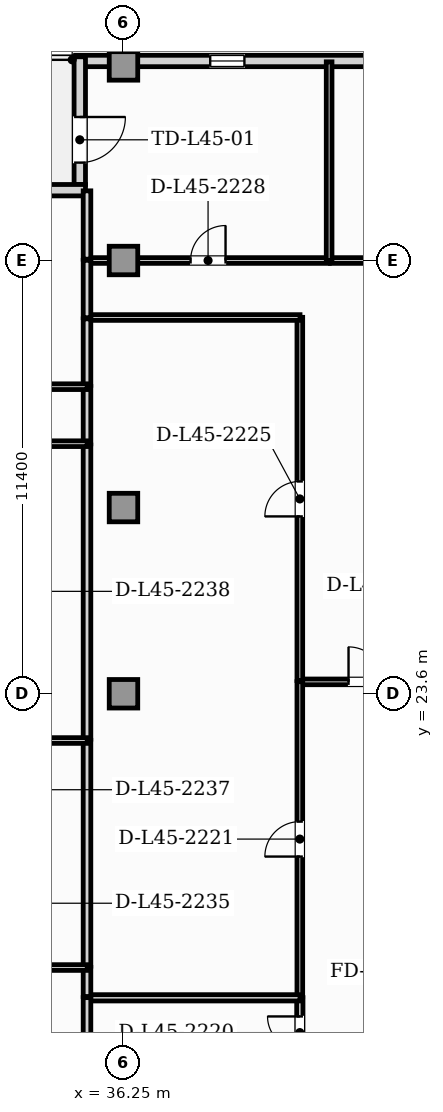
"""IFC4 building model, lengths in metres.
Left out: names, types, materials, properties, quantities, classifications, styles, units other than length and angle.
Written with IfcOpenShell. Run it as: python <this file> out.ifc"""

import sys

from ifc_helpers import new_model, si_unit, direction, frame, frame_2d, origin, origin_2d, place, context, subcontext, project, spatial, rectangle, extrude, element, fill, save


model = new_model("IFC4")
c1 = context("Model", 3, precision=1e-05, world=origin(), true_north=direction((0.0, 1.0)))
c2 = subcontext(c1, "Body", "Model", "MODEL_VIEW")
j1 = project(units=[si_unit("LENGTHUNIT", "METRE"), si_unit("PLANEANGLEUNIT", "RADIAN")], contexts=[c1])
p1 = place(None, origin())
s1 = spatial("IfcSite", under=j1, at=p1, CompositionType="ELEMENT")
p2 = place(p1, origin())
s2 = spatial("IfcBuilding", under=s1, at=p2, CompositionType="ELEMENT")
p3 = place(p2, frame((0.0, 0.0, 183.7)))
s3 = spatial("IfcBuildingStorey", under=s2, at=p3, CompositionType="ELEMENT", Elevation=183.7)
for number, where, z_axis, x_axis in (
    (1, (36.25, 23.6, 0.0), (0.0, 0.0, 1.0), (1.0, 0.0, 0.0)),
    (2, (36.25, 28.5, 0.0), (0.0, 0.0, 1.0), (1.0, 0.0, 0.0)),
    (3, (36.25, 40.12, 0.0), (0.0, 0.0, 1.0), (1.0, 0.0, 0.0)),
    (4, (36.25, 35.0, 0.0), (0.0, 0.0, 1.0), (1.0, 0.0, 0.0)),
):
    element("IfcColumn", number, at=place(p3, frame(where, z_axis=z_axis, x_axis=x_axis)), inside=s3, PredefinedType="COLUMN", context=c2, shape_type="SweptSolid", body=[
        extrude(rectangle(XDim=0.75, YDim=0.75, at=origin_2d()), origin(), (0.0, 0.0, 1.0), 3.85),
    ])
p4 = place(p3, frame((49.06, 40.25, 0.0), z_axis=(0.0, 0.0, 1.0), x_axis=(-1.0, 0.0, 0.0)))
e5 = element("IfcWall", 5, at=p4, inside=s3, PredefinedType="SOLIDWALL", context=c2, shape_type="SweptSolid", body=[
    extrude(rectangle(XDim=14.07, YDim=0.3, at=frame_2d((7.035, 0.0))), origin(), (0.0, 0.0, 1.0), 3.085),
])
p5 = place(p4, frame((9.628, 0.0, 0.85)))
e6 = element("IfcOpeningElement", 6, at=p5, cuts=e5, PredefinedType="OPENING", context=c2, shape_type="SweptSolid", body=[
    extrude(rectangle(XDim=0.9, YDim=1.4, at=frame_2d((0.45, 0.7))), frame((0.0, 0.16, 0.0), z_axis=(0.0, -1.0, 0.0), x_axis=(1.0, 0.0, 0.0)), (0.0, 0.0, 1.0), 0.32),
])
p6 = place(p4, frame((4.416, 0.0, 0.85)))
e7 = element("IfcOpeningElement", 7, at=p6, cuts=e5, PredefinedType="OPENING", context=c2, shape_type="SweptSolid", body=[
    extrude(rectangle(XDim=0.9, YDim=1.4, at=frame_2d((0.45, 0.7))), frame((0.0, 0.16, 0.0), z_axis=(0.0, -1.0, 0.0), x_axis=(1.0, 0.0, 0.0)), (0.0, 0.0, 1.0), 0.32),
])
p7 = place(p3, frame((35.1, 40.36, 0.0), z_axis=(0.0, 0.0, 1.0), x_axis=(0.0, -1.0, 0.0)))
e8 = element("IfcWall", 8, at=p7, inside=s3, PredefinedType="SOLIDWALL", context=c2, shape_type="SweptSolid", body=[
    extrude(rectangle(XDim=3.36, YDim=0.3, at=frame_2d((1.68, 0.0))), origin(), (0.0, 0.0, 1.0), 3.63),
])
p8 = place(p7, frame((1.584, 0.0, 0.0)))
e9 = element("IfcOpeningElement", 9, at=p8, cuts=e8, PredefinedType="OPENING", context=c2, shape_type="SweptSolid", body=[
    extrude(rectangle(XDim=1.2, YDim=2.2, at=frame_2d((0.6, 1.1))), frame((0.0, 0.16, 0.0), z_axis=(0.0, -1.0, 0.0), x_axis=(1.0, 0.0, 0.0)), (0.0, 0.0, 1.0), 0.32),
])
p9 = place(p3, frame((35.25, 36.85, 0.0), z_axis=(0.0, 0.0, 1.0), x_axis=(-1.0, 0.0, 0.0)))
e10 = element("IfcWall", 10, at=p9, inside=s3, PredefinedType="SOLIDWALL", context=c2, shape_type="SweptSolid", body=[
    extrude(rectangle(XDim=13.0, YDim=0.3, at=frame_2d((6.5, 0.0))), origin(), (0.0, 0.0, 1.0), 3.63),
])
p10 = place(p9, frame((8.251, 0.0, 0.88)))
e11 = element("IfcOpeningElement", 11, at=p10, cuts=e10, PredefinedType="OPENING", context=c2, shape_type="SweptSolid", body=[
    extrude(rectangle(XDim=1.65, YDim=2.0, at=frame_2d((0.825, 1.0))), frame((0.0, 0.16, 0.0), z_axis=(0.0, -1.0, 0.0), x_axis=(1.0, 0.0, 0.0)), (0.0, 0.0, 1.0), 0.32),
])
p11 = place(p9, frame((3.099, 0.0, 0.88)))
e12 = element("IfcOpeningElement", 12, at=p11, cuts=e10, PredefinedType="OPENING", context=c2, shape_type="SweptSolid", body=[
    extrude(rectangle(XDim=1.65, YDim=2.0, at=frame_2d((0.825, 1.0))), frame((0.0, 0.16, 0.0), z_axis=(0.0, -1.0, 0.0), x_axis=(1.0, 0.0, 0.0)), (0.0, 0.0, 1.0), 0.32),
])
p12 = place(p3, frame((40.885, 23.913, 0.0), z_axis=(0.0, 0.0, 1.0), x_axis=(1.0, 0.0, 0.0)))
e13 = element("IfcWall", 13, at=p12, inside=s3, PredefinedType="PARTITIONING", context=c2, shape_type="SweptSolid", body=[
    extrude(rectangle(XDim=4.99, YDim=0.15, at=frame_2d((2.495, 0.0))), origin(), (0.0, 0.0, 1.0), 3.63),
])
p13 = place(p12, frame((1.287, 0.0, 0.0)))
e14 = element("IfcOpeningElement", 14, at=p13, cuts=e13, PredefinedType="OPENING", context=c2, shape_type="SweptSolid", body=[
    extrude(rectangle(XDim=0.92, YDim=2.1, at=frame_2d((0.46, 1.05))), frame((0.0, 0.085, 0.0), z_axis=(0.0, -1.0, 0.0), x_axis=(1.0, 0.0, 0.0)), (0.0, 0.0, 1.0), 0.17),
])
p14 = place(p3, frame((40.89, 13.765, 0.0), z_axis=(0.0, 0.0, 1.0), x_axis=(0.0, 1.0, 0.0)))
e15 = element("IfcWall", 15, at=p14, inside=s3, PredefinedType="PLUMBINGWALL", context=c2, shape_type="SweptSolid", body=[
    extrude(rectangle(XDim=1.84, YDim=0.165, at=frame_2d((0.92, 0.0))), origin(), (0.0, 0.0, 1.0), 3.63),
])
p15 = place(p14, frame((0.495, 0.0, 0.0)))
e16 = element("IfcOpeningElement", 16, at=p15, cuts=e15, PredefinedType="OPENING", context=c2, shape_type="SweptSolid", body=[
    extrude(rectangle(XDim=0.85, YDim=2.1, at=frame_2d((0.425, 1.05))), frame((0.0, 0.093, 0.0), z_axis=(0.0, -1.0, 0.0), x_axis=(1.0, 0.0, 0.0)), (0.0, 0.0, 1.0), 0.185),
])
p16 = place(p3, frame((40.89, 15.635, 0.0), z_axis=(0.0, 0.0, 1.0), x_axis=(0.0, 1.0, 0.0)))
e17 = element("IfcWall", 17, at=p16, inside=s3, PredefinedType="PARTITIONING", context=c2, shape_type="SweptSolid", body=[
    extrude(rectangle(XDim=8.283, YDim=0.15, at=frame_2d((4.142, 0.0))), origin(), (0.0, 0.0, 1.0), 3.63),
])
p17 = place(p16, frame((3.682, 0.0, 0.0)))
e18 = element("IfcOpeningElement", 18, at=p17, cuts=e17, PredefinedType="OPENING", context=c2, shape_type="SweptSolid", body=[
    extrude(rectangle(XDim=0.92, YDim=2.1, at=frame_2d((0.46, 1.05))), frame((0.0, 0.085, 0.0), z_axis=(0.0, -1.0, 0.0), x_axis=(1.0, 0.0, 0.0)), (0.0, 0.0, 1.0), 0.17),
])
p18 = place(p3, frame((40.89, 23.948, 0.0), z_axis=(0.0, 0.0, 1.0), x_axis=(0.0, 1.0, 0.0)))
e19 = element("IfcWall", 19, at=p18, inside=s3, PredefinedType="PARTITIONING", context=c2, shape_type="SweptSolid", body=[
    extrude(rectangle(XDim=9.557, YDim=0.15, at=frame_2d((4.778, 0.0))), origin(), (0.0, 0.0, 1.0), 3.63),
])
p19 = place(p18, frame((4.318, 0.0, 0.0)))
e20 = element("IfcOpeningElement", 20, at=p19, cuts=e19, PredefinedType="OPENING", context=c2, shape_type="SweptSolid", body=[
    extrude(rectangle(XDim=0.92, YDim=2.1, at=frame_2d((0.46, 1.05))), frame((0.0, 0.085, 0.0), z_axis=(0.0, -1.0, 0.0), x_axis=(1.0, 0.0, 0.0)), (0.0, 0.0, 1.0), 0.17),
])
p20 = place(p3, frame((35.285, 33.5, 0.0), z_axis=(0.0, 0.0, 1.0), x_axis=(1.0, 0.0, 0.0)))
e21 = element("IfcWall", 21, at=p20, inside=s3, PredefinedType="PARTITIONING", context=c2, shape_type="SweptSolid", body=[
    extrude(rectangle(XDim=5.61, YDim=0.15, at=frame_2d((2.805, 0.0))), origin(), (0.0, 0.0, 1.0), 3.63),
])
p21 = place(p3, frame((35.285, 35.0, 0.0), z_axis=(0.0, 0.0, 1.0), x_axis=(1.0, 0.0, 0.0)))
e22 = element("IfcWall", 22, at=p21, inside=s3, PredefinedType="PARTITIONING", context=c2, shape_type="SweptSolid", body=[
    extrude(rectangle(XDim=6.381, YDim=0.15, at=frame_2d((3.19, 0.0))), origin(), (0.0, 0.0, 1.0), 3.013),
])
p22 = place(p21, frame((2.73, 0.0, 0.0)))
e23 = element("IfcOpeningElement", 23, at=p22, cuts=e22, PredefinedType="OPENING", context=c2, shape_type="SweptSolid", body=[
    extrude(rectangle(XDim=0.92, YDim=2.1, at=frame_2d((0.46, 1.05))), frame((0.0, 0.085, 0.0), z_axis=(0.0, -1.0, 0.0), x_axis=(1.0, 0.0, 0.0)), (0.0, 0.0, 1.0), 0.17),
])
p23 = place(p3, frame((41.696, 35.0, 0.0), z_axis=(0.0, 0.0, 1.0), x_axis=(1.0, 0.0, 0.0)))
e24 = element("IfcWall", 24, at=p23, inside=s3, PredefinedType="PARTITIONING", context=c2, shape_type="SweptSolid", body=[
    extrude(rectangle(XDim=5.038, YDim=0.15, at=frame_2d((2.519, 0.0))), origin(), (0.0, 0.0, 1.0), 3.013),
])
p24 = place(p23, frame((2.814, 0.0, 0.0)))
e25 = element("IfcOpeningElement", 25, at=p24, cuts=e24, PredefinedType="OPENING", context=c2, shape_type="SweptSolid", body=[
    extrude(rectangle(XDim=0.92, YDim=2.1, at=frame_2d((0.46, 1.05))), frame((0.0, 0.085, 0.0), z_axis=(0.0, -1.0, 0.0), x_axis=(1.0, 0.0, 0.0)), (0.0, 0.0, 1.0), 0.17),
])
p25 = place(p3, frame((35.29, 33.495, 0.0), z_axis=(0.0, 0.0, 1.0), x_axis=(0.0, 1.0, 0.0)))
e26 = element("IfcWall", 26, at=p25, inside=s3, PredefinedType="PARTITIONING", context=c2, shape_type="SweptSolid", body=[
    extrude(rectangle(XDim=1.51, YDim=0.2, at=frame_2d((0.755, 0.0))), origin(), (0.0, 0.0, 1.0), 3.63),
])
p26 = place(p3, frame((35.285, 15.6, 0.0), z_axis=(0.0, 0.0, 1.0), x_axis=(1.0, 0.0, 0.0)))
e27 = element("IfcWall", 27, at=p26, inside=s3, PredefinedType="PLUMBINGWALL", context=c2, shape_type="SweptSolid", body=[
    extrude(rectangle(XDim=5.61, YDim=0.165, at=frame_2d((2.805, 0.0))), origin(), (0.0, 0.0, 1.0), 3.63),
])
p27 = place(p3, frame((35.29, 13.765, 0.0), z_axis=(0.0, 0.0, 1.0), x_axis=(0.0, 1.0, 0.0)))
e28 = element("IfcWall", 28, at=p27, inside=s3, PredefinedType="PARTITIONING", context=c2, shape_type="SweptSolid", body=[
    extrude(rectangle(XDim=1.84, YDim=0.2, at=frame_2d((0.92, 0.0))), origin(), (0.0, 0.0, 1.0), 3.63),
])
p28 = place(p3, frame((35.29, 30.175, 0.0), z_axis=(0.0, 0.0, 1.0), x_axis=(0.0, 1.0, 0.0)))
e29 = element("IfcWall", 29, at=p28, inside=s3, PredefinedType="PARTITIONING", context=c2, shape_type="SweptSolid", body=[
    extrude(rectangle(XDim=1.51, YDim=0.2, at=frame_2d((0.755, 0.0))), origin(), (0.0, 0.0, 1.0), 3.63),
])
p29 = place(p3, frame((35.29, 15.635, 0.0), z_axis=(0.0, 0.0, 1.0), x_axis=(0.0, 1.0, 0.0)))
e30 = element("IfcWall", 30, at=p29, inside=s3, PredefinedType="PARTITIONING", context=c2, shape_type="SweptSolid", body=[
    extrude(rectangle(XDim=0.767, YDim=0.2, at=frame_2d((0.383, 0.0))), origin(), (0.0, 0.0, 1.0), 3.63),
])
p30 = place(p3, frame((35.29, 16.432, 0.0), z_axis=(0.0, 0.0, 1.0), x_axis=(0.0, 1.0, 0.0)))
e31 = element("IfcWall", 31, at=p30, inside=s3, PredefinedType="PARTITIONING", context=c2, shape_type="SweptSolid", body=[
    extrude(rectangle(XDim=5.943, YDim=0.2, at=frame_2d((2.972, 0.0))), origin(), (0.0, 0.0, 1.0), 3.63),
])
p31 = place(p3, frame((35.29, 22.405, 0.0), z_axis=(0.0, 0.0, 1.0), x_axis=(0.0, 1.0, 0.0)))
e32 = element("IfcWall", 32, at=p31, inside=s3, PredefinedType="PARTITIONING", context=c2, shape_type="SweptSolid", body=[
    extrude(rectangle(XDim=7.74, YDim=0.2, at=frame_2d((3.87, 0.0))), origin(), (0.0, 0.0, 1.0), 3.63),
])
p32 = place(p3, frame((35.29, 31.715, 0.0), z_axis=(0.0, 0.0, 1.0), x_axis=(0.0, 1.0, 0.0)))
e33 = element("IfcWall", 33, at=p32, inside=s3, PredefinedType="PARTITIONING", context=c2, shape_type="SweptSolid", body=[
    extrude(rectangle(XDim=1.75, YDim=0.2, at=frame_2d((0.875, 0.0))), origin(), (0.0, 0.0, 1.0), 3.63),
])
p33 = place(p3, frame((41.661, 34.995, 0.0), z_axis=(0.0, 0.0, 1.0), x_axis=(0.0, 1.0, 0.0)))
e34 = element("IfcWall", 34, at=p33, inside=s3, PredefinedType="PARTITIONING", context=c2, shape_type="SweptSolid", body=[
    extrude(rectangle(XDim=5.232, YDim=0.15, at=frame_2d((2.616, 0.0))), origin(), (0.0, 0.0, 1.0), 3.63),
])
p34 = place(p3, frame((35.29, 35.035, 0.0), z_axis=(0.0, 0.0, 1.0), x_axis=(0.0, 1.0, 0.0)))
e35 = element("IfcWall", 35, at=p34, inside=s3, PredefinedType="PARTITIONING", context=c2, shape_type="SweptSolid", body=[
    extrude(rectangle(XDim=1.798, YDim=0.2, at=frame_2d((0.899, 0.0))), origin(), (0.0, 0.0, 1.0), 3.63),
])
p35 = place(p3, frame((31.181, 30.18, 0.0), z_axis=(0.0, 0.0, 1.0), x_axis=(1.0, 0.0, 0.0)))
e36 = element("IfcWall", 36, at=p35, inside=s3, PredefinedType="PARTITIONING", context=c2, shape_type="SweptSolid", body=[
    extrude(rectangle(XDim=4.114, YDim=0.15, at=frame_2d((2.057, 0.0))), origin(), (0.0, 0.0, 1.0), 3.63),
])
p36 = place(p3, frame((28.785, 31.68, 0.0), z_axis=(0.0, 0.0, 1.0), x_axis=(1.0, 0.0, 0.0)))
e37 = element("IfcWall", 37, at=p36, inside=s3, PredefinedType="PARTITIONING", context=c2, shape_type="SweptSolid", body=[
    extrude(rectangle(XDim=6.51, YDim=0.15, at=frame_2d((3.255, 0.0))), origin(), (0.0, 0.0, 1.0), 3.63),
])
p37 = place(p36, frame((2.795, 0.0, 0.0)))
e38 = element("IfcOpeningElement", 38, at=p37, cuts=e37, PredefinedType="OPENING", context=c2, shape_type="SweptSolid", body=[
    extrude(rectangle(XDim=0.92, YDim=2.1, at=frame_2d((0.46, 1.05))), frame((0.0, 0.085, 0.0), z_axis=(0.0, -1.0, 0.0), x_axis=(1.0, 0.0, 0.0)), (0.0, 0.0, 1.0), 0.17),
])
for number, where, z_axis, x_axis in (
    (39, (31.181, 16.397, 0.0), (0.0, 0.0, 1.0), (1.0, 0.0, 0.0)),
    (40, (31.181, 22.37, 0.0), (0.0, 0.0, 1.0), (1.0, 0.0, 0.0)),
):
    element("IfcWall", number, at=place(p3, frame(where, z_axis=z_axis, x_axis=x_axis)), inside=s3, PredefinedType="PARTITIONING", context=c2, shape_type="SweptSolid", body=[
        extrude(rectangle(XDim=4.114, YDim=0.15, at=frame_2d((2.057, 0.0))), origin(), (0.0, 0.0, 1.0), 3.63),
    ])
p38 = place(p8, frame((1.2, 0.0, 0.0), z_axis=(0.0, 0.0, 1.0), x_axis=(-1.0, 0.0, 0.0)))
e41 = element("IfcDoor", 41, at=p38, inside=s3, OperationType="SINGLE_SWING_RIGHT", PredefinedType="DOOR", context=c2, shape_type="SweptSolid", body=[
    extrude(rectangle(XDim=1.2, YDim=2.2, at=frame_2d((0.6, 1.1))), frame((0.0, 0.025, 0.0), z_axis=(0.0, -1.0, 0.0), x_axis=(1.0, 0.0, 0.0)), (0.0, 0.0, 1.0), 0.05),
])
fill(e9, e41)
p39 = place(p5, origin())
e42 = element("IfcWindow", 42, at=p39, inside=s3, PartitioningType="SINGLE_PANEL", PredefinedType="WINDOW", context=c2, shape_type="SweptSolid", body=[
    extrude(rectangle(XDim=0.9, YDim=1.4, at=frame_2d((0.45, 0.7))), frame((0.0, 0.03, 0.0), z_axis=(0.0, -1.0, 0.0), x_axis=(1.0, 0.0, 0.0)), (0.0, 0.0, 1.0), 0.06),
])
fill(e6, e42)
p40 = place(p13, origin())
e43 = element("IfcDoor", 43, at=p40, inside=s3, OperationType="SINGLE_SWING_LEFT", PredefinedType="DOOR", context=c2, shape_type="SweptSolid", body=[
    extrude(rectangle(XDim=0.92, YDim=2.1, at=frame_2d((0.46, 1.05))), frame((0.0, 0.025, 0.0), z_axis=(0.0, -1.0, 0.0), x_axis=(1.0, 0.0, 0.0)), (0.0, 0.0, 1.0), 0.05),
])
fill(e14, e43)
p41 = place(p15, origin())
e44 = element("IfcDoor", 44, at=p41, inside=s3, OperationType="SINGLE_SWING_RIGHT", PredefinedType="DOOR", context=c2, shape_type="SweptSolid", body=[
    extrude(rectangle(XDim=0.85, YDim=2.1, at=frame_2d((0.425, 1.05))), frame((0.0, 0.025, 0.0), z_axis=(0.0, -1.0, 0.0), x_axis=(1.0, 0.0, 0.0)), (0.0, 0.0, 1.0), 0.05),
])
fill(e16, e44)
p42 = place(p17, origin())
e45 = element("IfcDoor", 45, at=p42, inside=s3, OperationType="SINGLE_SWING_LEFT", PredefinedType="DOOR", context=c2, shape_type="SweptSolid", body=[
    extrude(rectangle(XDim=0.92, YDim=2.1, at=frame_2d((0.46, 1.05))), frame((0.0, 0.025, 0.0), z_axis=(0.0, -1.0, 0.0), x_axis=(1.0, 0.0, 0.0)), (0.0, 0.0, 1.0), 0.05),
])
fill(e18, e45)
p43 = place(p19, origin())
e46 = element("IfcDoor", 46, at=p43, inside=s3, OperationType="SINGLE_SWING_LEFT", PredefinedType="DOOR", context=c2, shape_type="SweptSolid", body=[
    extrude(rectangle(XDim=0.92, YDim=2.1, at=frame_2d((0.46, 1.05))), frame((0.0, 0.025, 0.0), z_axis=(0.0, -1.0, 0.0), x_axis=(1.0, 0.0, 0.0)), (0.0, 0.0, 1.0), 0.05),
])
fill(e20, e46)
p44 = place(p22, origin())
e47 = element("IfcDoor", 47, at=p44, inside=s3, OperationType="SINGLE_SWING_RIGHT", PredefinedType="DOOR", context=c2, shape_type="SweptSolid", body=[
    extrude(rectangle(XDim=0.92, YDim=2.1, at=frame_2d((0.46, 1.05))), frame((0.0, 0.025, 0.0), z_axis=(0.0, -1.0, 0.0), x_axis=(1.0, 0.0, 0.0)), (0.0, 0.0, 1.0), 0.05),
])
fill(e23, e47)
save(model, sys.argv[1])
